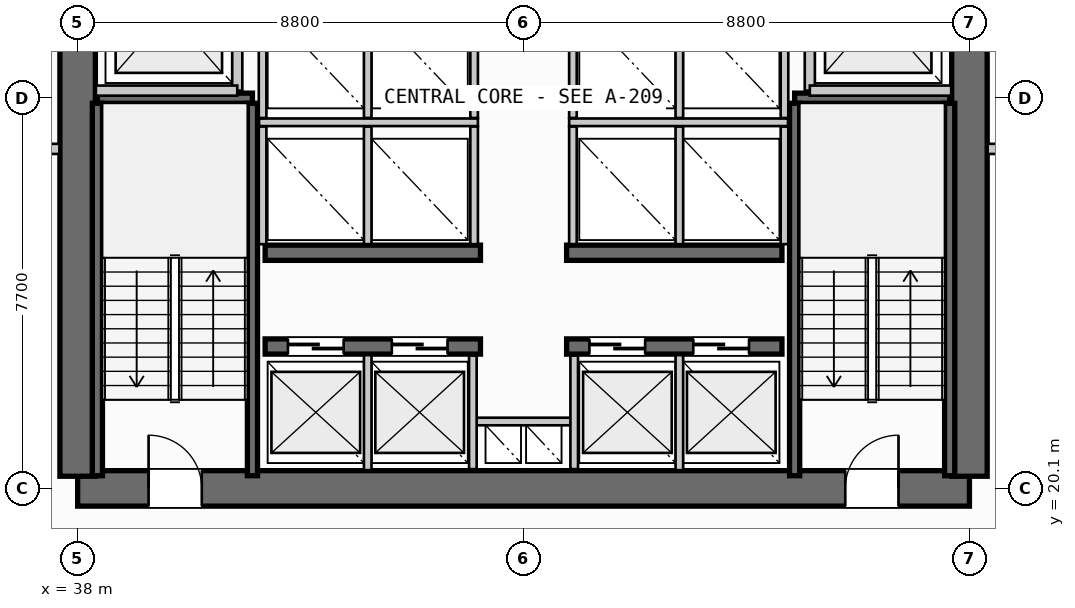
"""IFC4 building model, lengths in metres.
Left out: names, types, materials, properties, quantities, classifications, styles, units other than length and angle.
Written with IfcOpenShell. Run it as: python <this file> out.ifc"""

import sys

from ifc_helpers import new_model, si_unit, direction, frame, frame_2d, origin, place, context, subcontext, project, spatial, rectangle, extrude, source, transform, mapped, element, fill, save


model = new_model("IFC4")
c1 = context("Model", 3, precision=1e-05, world=origin(), true_north=direction((0.0, 1.0)))
c2 = subcontext(c1, "Body", "Model", "MODEL_VIEW")
j1 = project(units=[si_unit("LENGTHUNIT", "METRE"), si_unit("PLANEANGLEUNIT", "RADIAN")], contexts=[c1])
p1 = place(None, origin())
s1 = spatial("IfcSite", under=j1, at=p1, CompositionType="ELEMENT")
p2 = place(p1, origin())
s2 = spatial("IfcBuilding", under=s1, at=p2, CompositionType="ELEMENT")
p3 = place(p2, frame((0.0, 0.0, 63.8)))
s3 = spatial("IfcBuildingStorey", under=s2, at=p3, CompositionType="ELEMENT", Elevation=63.8)
p4 = place(p3, frame((38.0, 20.1, 0.0), z_axis=(0.0, 0.0, 1.0), x_axis=(1.0, 0.0, 0.0)))
e1 = element("IfcWall", 1, at=p4, inside=s3, PredefinedType="SHEAR", context=c2, shape_type="SweptSolid", body=[
    extrude(rectangle(XDim=17.6, YDim=0.7, at=frame_2d((8.8, 0.0))), origin(), (0.0, 0.0, 1.0), 3.55),
])
p5 = place(p4, frame((1.4, 0.0, 0.0)))
e2 = element("IfcOpeningElement", 2, at=p5, cuts=e1, PredefinedType="OPENING", context=c2, shape_type="SweptSolid", body=[
    extrude(rectangle(XDim=1.05, YDim=2.15, at=frame_2d((0.525, 1.075))), frame((0.0, 0.36, 0.0), z_axis=(0.0, -1.0, 0.0), x_axis=(1.0, 0.0, 0.0)), (0.0, 0.0, 1.0), 0.72),
])
p6 = place(p4, frame((15.15, 0.0, 0.0)))
e3 = element("IfcOpeningElement", 3, at=p6, cuts=e1, PredefinedType="OPENING", context=c2, shape_type="SweptSolid", body=[
    extrude(rectangle(XDim=1.05, YDim=2.15, at=frame_2d((0.525, 1.075))), frame((0.0, 0.36, 0.0), z_axis=(0.0, -1.0, 0.0), x_axis=(1.0, 0.0, 0.0)), (0.0, 0.0, 1.0), 0.72),
])
p7 = place(p3, frame((38.0, 35.26, 0.0), z_axis=(0.0, 0.0, 1.0), x_axis=(0.0, -1.0, 0.0)))
e4 = element("IfcWall", 4, at=p7, inside=s3, PredefinedType="SHEAR", context=c2, shape_type="SweptSolid", body=[
    extrude(rectangle(XDim=14.92, YDim=0.7, at=frame_2d((7.46, 0.0))), origin(), (0.0, 0.0, 1.0), 3.55),
])
p8 = place(p7, frame((5.21, 0.0, 0.0)))
e5 = element("IfcOpeningElement", 5, at=p8, cuts=e4, PredefinedType="OPENING", context=c2, shape_type="SweptSolid", body=[
    extrude(rectangle(XDim=1.1, YDim=2.2, at=frame_2d((0.55, 1.1))), frame((0.0, 0.36, 0.0), z_axis=(0.0, -1.0, 0.0), x_axis=(1.0, 0.0, 0.0)), (0.0, 0.0, 1.0), 0.72),
])
p9 = place(p3, frame((55.6, 20.34, 0.0), z_axis=(0.0, 0.0, 1.0), x_axis=(0.0, 1.0, 0.0)))
e6 = element("IfcWall", 6, at=p9, inside=s3, PredefinedType="SHEAR", context=c2, shape_type="SweptSolid", body=[
    extrude(rectangle(XDim=14.92, YDim=0.7, at=frame_2d((7.46, 0.0))), origin(), (0.0, 0.0, 1.0), 3.55),
])
p10 = place(p9, frame((12.71, 0.0, 0.0)))
e7 = element("IfcOpeningElement", 7, at=p10, cuts=e6, PredefinedType="OPENING", context=c2, shape_type="SweptSolid", body=[
    extrude(rectangle(XDim=1.05, YDim=2.15, at=frame_2d((0.525, 1.075))), frame((0.0, 0.36, 0.0), z_axis=(0.0, -1.0, 0.0), x_axis=(1.0, 0.0, 0.0)), (0.0, 0.0, 1.0), 0.72),
])
p11 = place(p9, frame((8.61, 0.0, 0.0)))
e8 = element("IfcOpeningElement", 8, at=p11, cuts=e6, PredefinedType="OPENING", context=c2, shape_type="SweptSolid", body=[
    extrude(rectangle(XDim=1.1, YDim=2.2, at=frame_2d((0.55, 1.1))), frame((0.0, 0.36, 0.0), z_axis=(0.0, -1.0, 0.0), x_axis=(1.0, 0.0, 0.0)), (0.0, 0.0, 1.0), 0.72),
])
p12 = place(p3, frame((41.7, 22.9, 0.0), z_axis=(0.0, 0.0, 1.0), x_axis=(1.0, 0.0, 0.0)))
e9 = element("IfcWall", 9, at=p12, inside=s3, PredefinedType="SHEAR", context=c2, shape_type="SweptSolid", body=[
    extrude(rectangle(XDim=4.25, YDim=0.3, at=frame_2d((2.125, 0.0))), origin(), (0.0, 0.0, 1.0), 3.55),
])
p13 = place(p12, frame((0.45, 0.0, 0.0)))
e10 = element("IfcOpeningElement", 10, at=p13, cuts=e9, PredefinedType="OPENING", context=c2, shape_type="SweptSolid", body=[
    extrude(rectangle(XDim=1.1, YDim=2.2, at=frame_2d((0.55, 1.1))), frame((0.0, 0.16, 0.0), z_axis=(0.0, -1.0, 0.0), x_axis=(1.0, 0.0, 0.0)), (0.0, 0.0, 1.0), 0.32),
])
p14 = place(p12, frame((2.5, 0.0, 0.0)))
e11 = element("IfcOpeningElement", 11, at=p14, cuts=e9, PredefinedType="OPENING", context=c2, shape_type="SweptSolid", body=[
    extrude(rectangle(XDim=1.1, YDim=2.2, at=frame_2d((0.55, 1.1))), frame((0.0, 0.16, 0.0), z_axis=(0.0, -1.0, 0.0), x_axis=(1.0, 0.0, 0.0)), (0.0, 0.0, 1.0), 0.32),
])
p15 = place(p3, frame((47.65, 22.9, 0.0), z_axis=(0.0, 0.0, 1.0), x_axis=(1.0, 0.0, 0.0)))
e12 = element("IfcWall", 12, at=p15, inside=s3, PredefinedType="SHEAR", context=c2, shape_type="SweptSolid", body=[
    extrude(rectangle(XDim=4.25, YDim=0.3, at=frame_2d((2.125, 0.0))), origin(), (0.0, 0.0, 1.0), 3.55),
])
p16 = place(p15, frame((0.45, 0.0, 0.0)))
e13 = element("IfcOpeningElement", 13, at=p16, cuts=e12, PredefinedType="OPENING", context=c2, shape_type="SweptSolid", body=[
    extrude(rectangle(XDim=1.1, YDim=2.2, at=frame_2d((0.55, 1.1))), frame((0.0, 0.16, 0.0), z_axis=(0.0, -1.0, 0.0), x_axis=(1.0, 0.0, 0.0)), (0.0, 0.0, 1.0), 0.32),
])
p17 = place(p15, frame((2.5, 0.0, 0.0)))
e14 = element("IfcOpeningElement", 14, at=p17, cuts=e12, PredefinedType="OPENING", context=c2, shape_type="SweptSolid", body=[
    extrude(rectangle(XDim=1.1, YDim=2.2, at=frame_2d((0.55, 1.1))), frame((0.0, 0.16, 0.0), z_axis=(0.0, -1.0, 0.0), x_axis=(1.0, 0.0, 0.0)), (0.0, 0.0, 1.0), 0.32),
])
for number, where, z_axis, x_axis in (
    (15, (41.7, 24.75, 0.0), (0.0, 0.0, 1.0), (1.0, 0.0, 0.0)),
    (16, (47.65, 24.75, 0.0), (0.0, 0.0, 1.0), (1.0, 0.0, 0.0)),
):
    element("IfcWall", number, at=place(p3, frame(where, z_axis=z_axis, x_axis=x_axis)), inside=s3, PredefinedType="SHEAR", context=c2, shape_type="SweptSolid", body=[
        extrude(rectangle(XDim=4.25, YDim=0.3, at=frame_2d((2.125, 0.0))), origin(), (0.0, 0.0, 1.0), 3.55),
    ])
p18 = place(p3, frame((38.39, 27.8, 0.0), z_axis=(0.0, 0.0, 1.0), x_axis=(1.0, 0.0, 0.0)))
e17 = element("IfcWall", 17, at=p18, inside=s3, PredefinedType="SHEAR", context=c2, shape_type="SweptSolid", body=[
    extrude(rectangle(XDim=3.06, YDim=0.2, at=frame_2d((1.53, 0.0))), origin(), (0.0, 0.0, 1.0), 3.55),
])
for number, where, z_axis, x_axis in (
    (18, (41.45, 27.7, 0.0), (0.0, 0.0, 1.0), (0.0, -1.0, 0.0)),
    (19, (38.39, 20.35, 0.0), (0.0, 0.0, 1.0), (0.0, 1.0, 0.0)),
):
    element("IfcWall", number, at=place(p3, frame(where, z_axis=z_axis, x_axis=x_axis)), inside=s3, PredefinedType="SHEAR", context=c2, shape_type="SweptSolid", body=[
        extrude(rectangle(XDim=7.35, YDim=0.2, at=frame_2d((3.675, 0.0))), origin(), (0.0, 0.0, 1.0), 3.55),
    ])
p19 = place(p3, frame((52.15, 27.8, 0.0), z_axis=(0.0, 0.0, 1.0), x_axis=(1.0, 0.0, 0.0)))
e20 = element("IfcWall", 20, at=p19, inside=s3, PredefinedType="SHEAR", context=c2, shape_type="SweptSolid", body=[
    extrude(rectangle(XDim=3.06, YDim=0.2, at=frame_2d((1.53, 0.0))), origin(), (0.0, 0.0, 1.0), 3.55),
])
for number, where, z_axis, x_axis in (
    (21, (55.21, 27.7, 0.0), (0.0, 0.0, 1.0), (0.0, -1.0, 0.0)),
    (22, (52.15, 20.35, 0.0), (0.0, 0.0, 1.0), (0.0, 1.0, 0.0)),
):
    element("IfcWall", number, at=place(p3, frame(where, z_axis=z_axis, x_axis=x_axis)), inside=s3, PredefinedType="SHEAR", context=c2, shape_type="SweptSolid", body=[
        extrude(rectangle(XDim=7.35, YDim=0.2, at=frame_2d((3.675, 0.0))), origin(), (0.0, 0.0, 1.0), 3.55),
    ])
p20 = place(p3, frame((45.8, 21.42, 0.0), z_axis=(0.0, 0.0, 1.0), x_axis=(1.0, 0.0, 0.0)))
e23 = element("IfcWall", 23, at=p20, inside=s3, PredefinedType="PARTITIONING", context=c2, shape_type="SweptSolid", body=[
    extrude(rectangle(XDim=2.0, YDim=0.15, at=frame_2d((1.0, 0.0))), origin(), (0.0, 0.0, 1.0), 2.505),
])
for number, where, z_axis, x_axis in (
    (24, (45.8, 20.48, 0.0), (0.0, 0.0, 1.0), (0.0, 1.0, 0.0)),
    (25, (47.8, 20.48, 0.0), (0.0, 0.0, 1.0), (0.0, 1.0, 0.0)),
):
    element("IfcWall", number, at=place(p3, frame(where, z_axis=z_axis, x_axis=x_axis)), inside=s3, PredefinedType="PARTITIONING", context=c2, shape_type="SweptSolid", body=[
        extrude(rectangle(XDim=2.24, YDim=0.15, at=frame_2d((1.12, 0.0))), origin(), (0.0, 0.0, 1.0), 2.505),
    ])
p21 = place(p3, frame((41.15, 27.95, 0.0), z_axis=(0.0, 0.0, 1.0), x_axis=(0.0, 1.0, 0.0)))
e26 = element("IfcWall", 26, at=p21, inside=s3, PredefinedType="PARTITIONING", context=c2, shape_type="SweptSolid", body=[
    extrude(rectangle(XDim=3.1, YDim=0.2, at=frame_2d((1.55, 0.0))), origin(), (0.0, 0.0, 1.0), 2.505),
])
p22 = place(p3, frame((38.36, 27.95, 0.0), z_axis=(0.0, 0.0, 1.0), x_axis=(1.0, 0.0, 0.0)))
e27 = element("IfcWall", 27, at=p22, inside=s3, PredefinedType="PARTITIONING", context=c2, shape_type="SweptSolid", body=[
    extrude(rectangle(XDim=2.79, YDim=0.2, at=frame_2d((1.395, 0.0))), origin(), (0.0, 0.0, 1.0), 2.505),
])
p23 = place(p3, frame((34.5, 26.8, 0.0), z_axis=(0.0, 0.0, 1.0), x_axis=(1.0, 0.0, 0.0)))
e28 = element("IfcWall", 28, at=p23, inside=s3, PredefinedType="PARTITIONING", context=c2, shape_type="SweptSolid", body=[
    extrude(rectangle(XDim=3.14, YDim=0.2, at=frame_2d((1.57, 0.0))), origin(), (0.0, 0.0, 1.0), 2.505),
])
p24 = place(p3, frame((52.45, 27.95, 0.0), z_axis=(0.0, 0.0, 1.0), x_axis=(0.0, 1.0, 0.0)))
e29 = element("IfcWall", 29, at=p24, inside=s3, PredefinedType="PARTITIONING", context=c2, shape_type="SweptSolid", body=[
    extrude(rectangle(XDim=3.1, YDim=0.2, at=frame_2d((1.55, 0.0))), origin(), (0.0, 0.0, 1.0), 2.505),
])
p25 = place(p3, frame((52.45, 27.95, 0.0), z_axis=(0.0, 0.0, 1.0), x_axis=(1.0, 0.0, 0.0)))
e30 = element("IfcWall", 30, at=p25, inside=s3, PredefinedType="PARTITIONING", context=c2, shape_type="SweptSolid", body=[
    extrude(rectangle(XDim=2.79, YDim=0.2, at=frame_2d((1.395, 0.0))), origin(), (0.0, 0.0, 1.0), 2.505),
])
p26 = place(p3, frame((55.96, 26.8, 0.0), z_axis=(0.0, 0.0, 1.0), x_axis=(1.0, 0.0, 0.0)))
e31 = element("IfcWall", 31, at=p26, inside=s3, PredefinedType="PARTITIONING", context=c2, shape_type="SweptSolid", body=[
    extrude(rectangle(XDim=3.14, YDim=0.2, at=frame_2d((1.57, 0.0))), origin(), (0.0, 0.0, 1.0), 2.505),
])
for number, where, z_axis, x_axis in (
    (32, (43.725, 20.46, 0.0), (0.0, 0.0, 1.0), (0.0, 1.0, 0.0)),
    (33, (49.875, 20.46, 0.0), (0.0, 0.0, 1.0), (0.0, 1.0, 0.0)),
):
    element("IfcWall", number, at=place(p3, frame(where, z_axis=z_axis, x_axis=x_axis)), inside=s3, PredefinedType="PARTITIONING", context=c2, shape_type="SweptSolid", body=[
        extrude(rectangle(XDim=2.27, YDim=0.15, at=frame_2d((1.135, 0.0))), origin(), (0.0, 0.0, 1.0), 2.505),
    ])
p27 = place(p3, frame((41.58, 27.325, 0.0), z_axis=(0.0, 0.0, 1.0), x_axis=(1.0, 0.0, 0.0)))
e34 = element("IfcWall", 34, at=p27, inside=s3, PredefinedType="PARTITIONING", context=c2, shape_type="SweptSolid", body=[
    extrude(rectangle(XDim=4.32, YDim=0.15, at=frame_2d((2.16, 0.0))), origin(), (0.0, 0.0, 1.0), 2.505),
])
p28 = place(p3, frame((47.7, 27.325, 0.0), z_axis=(0.0, 0.0, 1.0), x_axis=(1.0, 0.0, 0.0)))
e35 = element("IfcWall", 35, at=p28, inside=s3, PredefinedType="PARTITIONING", context=c2, shape_type="SweptSolid", body=[
    extrude(rectangle(XDim=4.32, YDim=0.15, at=frame_2d((2.16, 0.0))), origin(), (0.0, 0.0, 1.0), 2.505),
])
for number, where, z_axis, x_axis in (
    (36, (41.65, 24.92, 0.0), (0.0, 0.0, 1.0), (0.0, 1.0, 0.0)),
    (37, (43.725, 24.92, 0.0), (0.0, 0.0, 1.0), (0.0, 1.0, 0.0)),
    (38, (45.825, 24.92, 0.0), (0.0, 0.0, 1.0), (0.0, 1.0, 0.0)),
    (39, (47.775, 24.92, 0.0), (0.0, 0.0, 1.0), (0.0, 1.0, 0.0)),
    (40, (49.875, 24.92, 0.0), (0.0, 0.0, 1.0), (0.0, 1.0, 0.0)),
    (41, (51.95, 24.92, 0.0), (0.0, 0.0, 1.0), (0.0, 1.0, 0.0)),
):
    element("IfcWall", number, at=place(p3, frame(where, z_axis=z_axis, x_axis=x_axis)), inside=s3, PredefinedType="PARTITIONING", context=c2, shape_type="SweptSolid", body=[
        extrude(rectangle(XDim=2.32, YDim=0.15, at=frame_2d((1.16, 0.0))), origin(), (0.0, 0.0, 1.0), 2.505),
    ])
for number, where, z_axis, x_axis in (
    (42, (41.65, 27.41, 0.0), (0.0, 0.0, 1.0), (0.0, 1.0, 0.0)),
    (43, (43.725, 27.41, 0.0), (0.0, 0.0, 1.0), (0.0, 1.0, 0.0)),
    (44, (45.825, 27.41, 0.0), (0.0, 0.0, 1.0), (0.0, 1.0, 0.0)),
    (45, (47.775, 27.41, 0.0), (0.0, 0.0, 1.0), (0.0, 1.0, 0.0)),
    (46, (49.875, 27.41, 0.0), (0.0, 0.0, 1.0), (0.0, 1.0, 0.0)),
    (47, (51.95, 27.41, 0.0), (0.0, 0.0, 1.0), (0.0, 1.0, 0.0)),
):
    element("IfcWall", number, at=place(p3, frame(where, z_axis=z_axis, x_axis=x_axis)), inside=s3, PredefinedType="PARTITIONING", context=c2, shape_type="SweptSolid", body=[
        extrude(rectangle(XDim=2.27, YDim=0.15, at=frame_2d((1.135, 0.0))), origin(), (0.0, 0.0, 1.0), 2.505),
    ])
m1 = source(origin(), c2, "Body", "SweptSolid", [
    extrude(rectangle(XDim=1.05, YDim=2.15, at=frame_2d((0.525, 1.075))), frame((0.0, 0.025, 0.0), z_axis=(0.0, -1.0, 0.0), x_axis=(1.0, 0.0, 0.0)), (0.0, 0.0, 1.0), 0.05),
])
p29 = place(p5, origin())
e48 = element("IfcDoor", 48, at=p29, inside=s3, OperationType="SINGLE_SWING_LEFT", PredefinedType="DOOR", context=c2, shape_type="MappedRepresentation", body=[
    mapped(m1, transform((0.0, 0.0, 0.0), scale=1.0)),
])
fill(e2, e48)
p30 = place(p6, origin())
e49 = element("IfcDoor", 49, at=p30, inside=s3, OperationType="SINGLE_SWING_RIGHT", PredefinedType="DOOR", context=c2, shape_type="MappedRepresentation", body=[
    mapped(m1, transform((0.0, 0.0, 0.0), scale=1.0)),
])
fill(e3, e49)
m2 = source(origin(), c2, "Body", "SweptSolid", [
    extrude(rectangle(XDim=1.1, YDim=2.2, at=frame_2d((0.55, 1.1))), frame((0.0, 0.025, 0.0), z_axis=(0.0, -1.0, 0.0), x_axis=(1.0, 0.0, 0.0)), (0.0, 0.0, 1.0), 0.05),
])
p31 = place(p13, origin())
e50 = element("IfcDoor", 50, at=p31, inside=s3, OperationType="SLIDING_TO_LEFT", PredefinedType="DOOR", context=c2, shape_type="MappedRepresentation", body=[
    mapped(m2, transform((0.0, 0.0, 0.0), scale=1.0)),
])
fill(e10, e50)
p32 = place(p14, origin())
e51 = element("IfcDoor", 51, at=p32, inside=s3, OperationType="SLIDING_TO_LEFT", PredefinedType="DOOR", context=c2, shape_type="MappedRepresentation", body=[
    mapped(m2, transform((0.0, 0.0, 0.0), scale=1.0)),
])
fill(e11, e51)
p33 = place(p16, origin())
e52 = element("IfcDoor", 52, at=p33, inside=s3, OperationType="SLIDING_TO_LEFT", PredefinedType="DOOR", context=c2, shape_type="MappedRepresentation", body=[
    mapped(m2, transform((0.0, 0.0, 0.0), scale=1.0)),
])
fill(e13, e52)
p34 = place(p17, origin())
e53 = element("IfcDoor", 53, at=p34, inside=s3, OperationType="SLIDING_TO_LEFT", PredefinedType="DOOR", context=c2, shape_type="MappedRepresentation", body=[
    mapped(m2, transform((0.0, 0.0, 0.0), scale=1.0)),
])
fill(e14, e53)
save(model, sys.argv[1])
